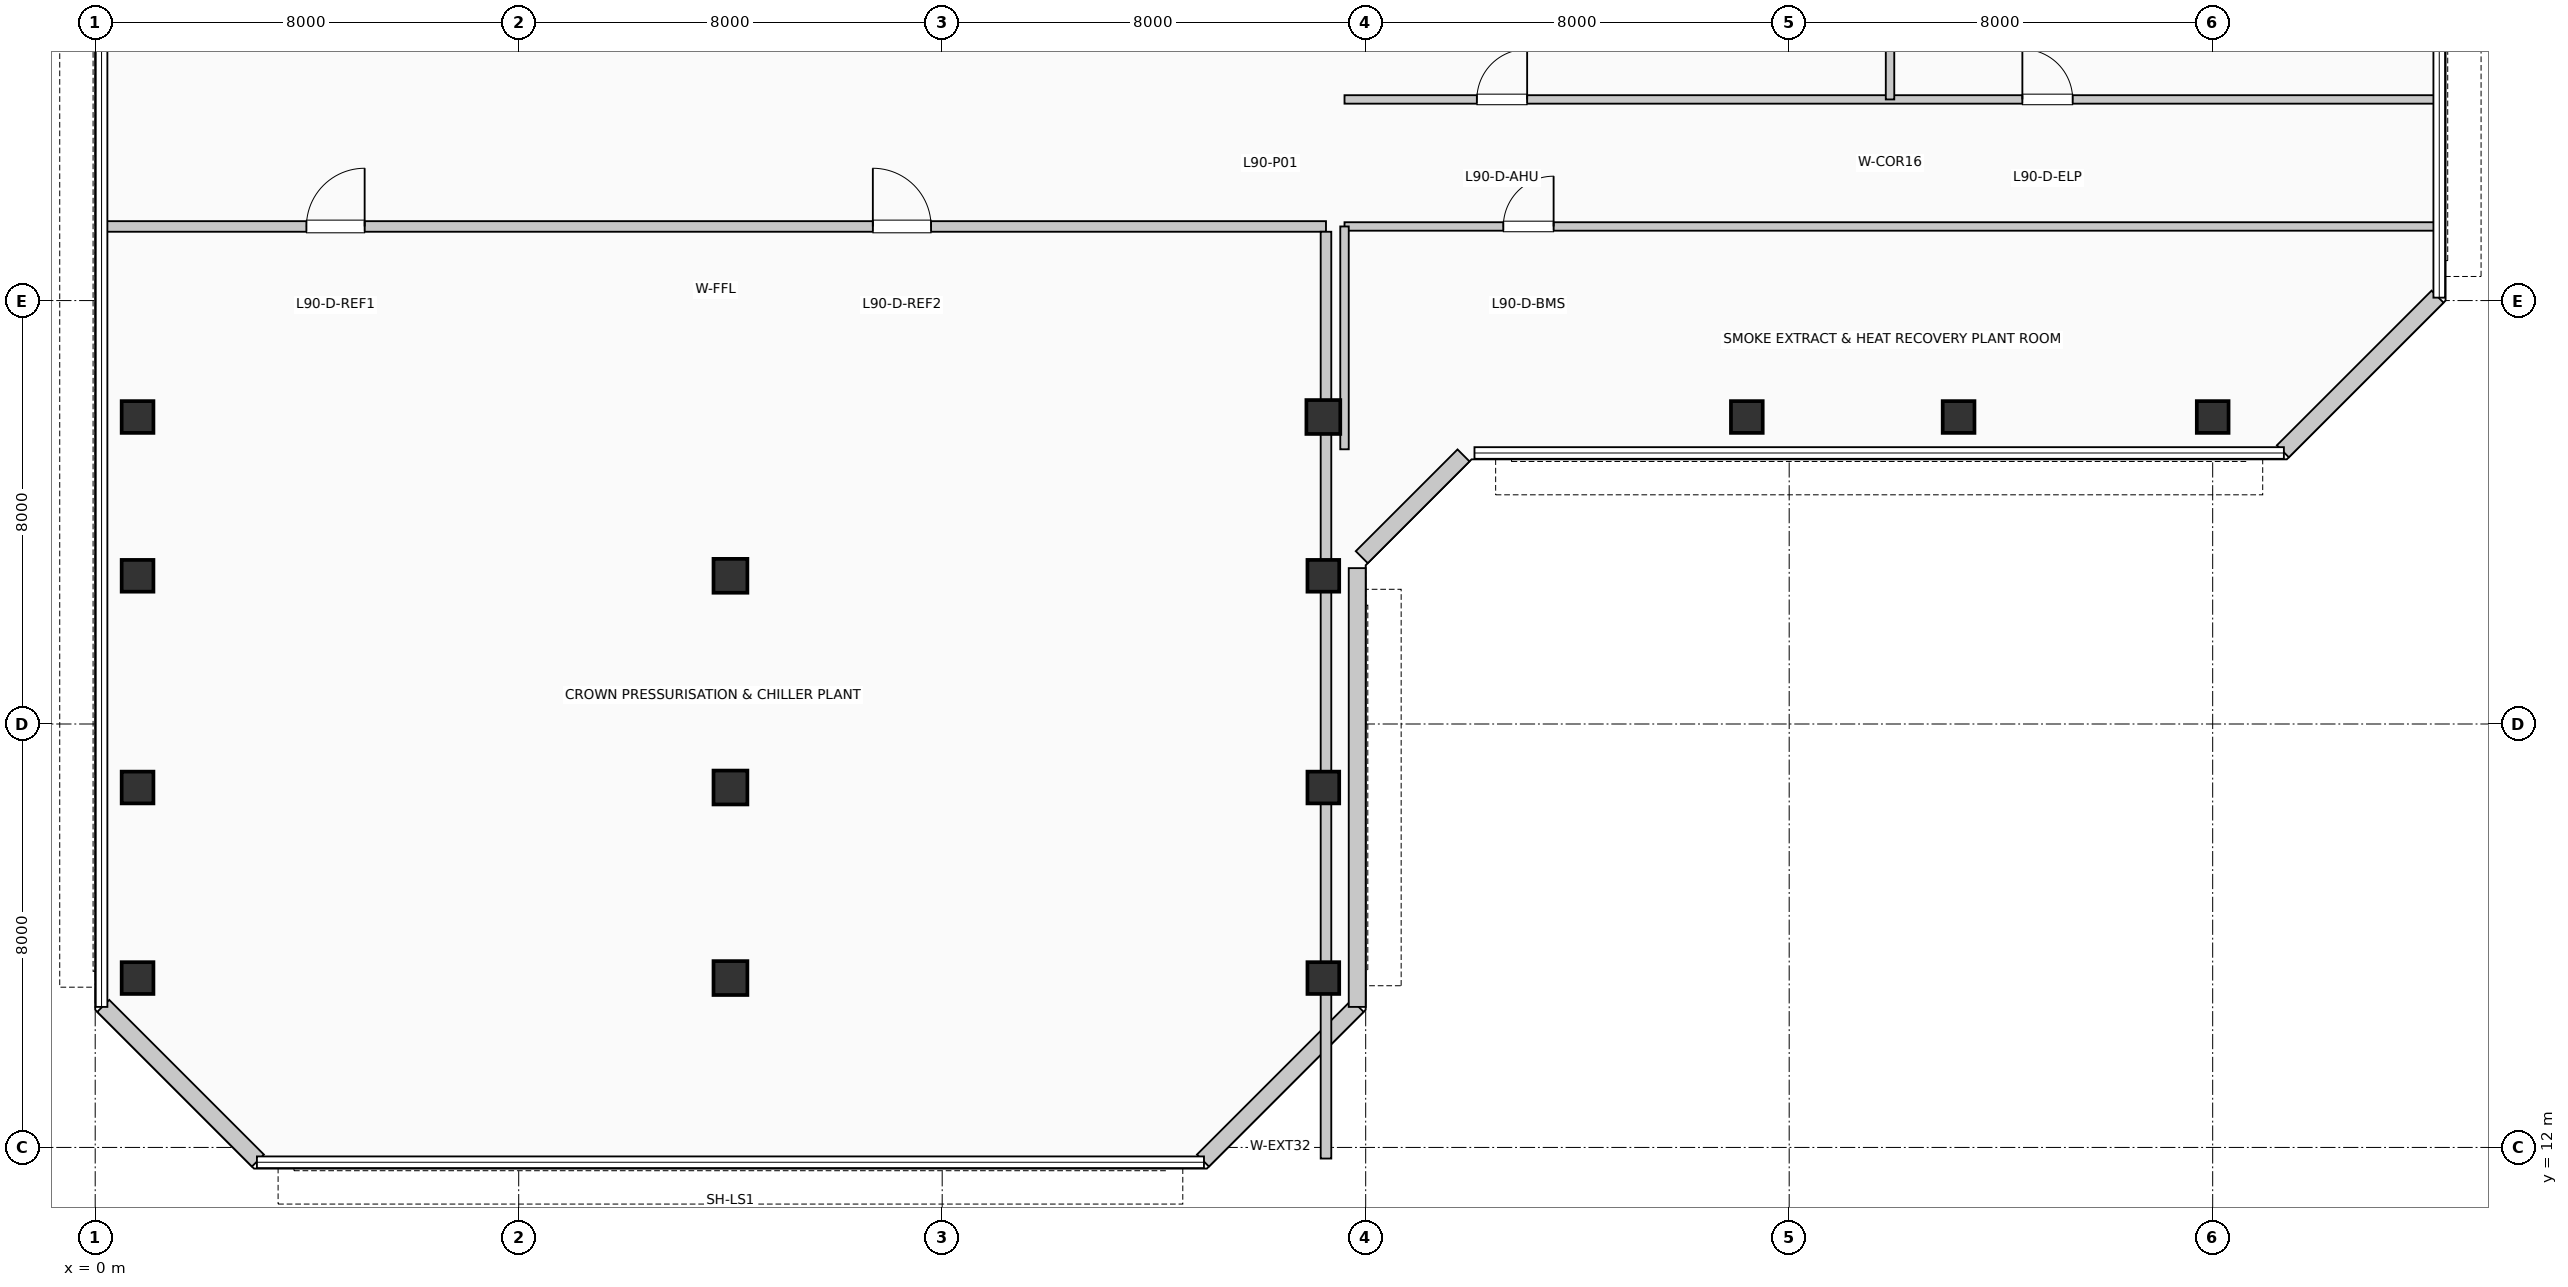
"""IFC4 building model, lengths in metres.
Left out: names, types, materials, properties, quantities, classifications, styles, units other than length and angle.
Written with IfcOpenShell. Run it as: python <this file> out.ifc"""

import sys

from ifc_helpers import new_model, si_unit, direction, frame, frame_2d, origin, origin_2d, place, context, subcontext, project, spatial, rectangle, extrude, element, fill, save


model = new_model("IFC4")
c1 = context("Model", 3, precision=1e-05, world=origin(), true_north=direction((0.0, 1.0)))
c2 = subcontext(c1, "Body", "Model", "MODEL_VIEW")
j1 = project(units=[si_unit("LENGTHUNIT", "METRE"), si_unit("PLANEANGLEUNIT", "RADIAN")], contexts=[c1])
p1 = place(None, origin())
s1 = spatial("IfcSite", under=j1, at=p1, CompositionType="ELEMENT")
p2 = place(p1, origin())
s2 = spatial("IfcBuilding", under=s1, at=p2, CompositionType="ELEMENT")
p3 = place(p2, frame((0.0, 0.0, 369.93)))
s3 = spatial("IfcBuildingStorey", under=s2, at=p3, CompositionType="ELEMENT", Elevation=369.93)
for number, where, z_axis, x_axis in (
    (1, (0.8, 15.2, 0.0), (0.0, 0.0, 1.0), (1.0, 0.0, 0.0)),
    (2, (0.8, 18.8, 0.0), (0.0, 0.0, 1.0), (1.0, 0.0, 0.0)),
    (3, (0.8, 22.8, 0.0), (0.0, 0.0, 1.0), (1.0, 0.0, 0.0)),
    (4, (0.8, 25.8, 0.0), (0.0, 0.0, 1.0), (1.0, 0.0, 0.0)),
):
    element("IfcColumn", number, at=place(p3, frame(where, z_axis=z_axis, x_axis=x_axis)), inside=s3, PredefinedType="COLUMN", context=c2, shape_type="SweptSolid", body=[
        extrude(rectangle(XDim=0.6, YDim=0.6, at=origin_2d()), origin(), (0.0, 0.0, 1.0), 3.96),
    ])
for number, where, z_axis, x_axis in (
    (5, (12.0, 15.2, 0.0), (0.0, 0.0, 1.0), (1.0, 0.0, 0.0)),
    (6, (12.0, 18.8, 0.0), (0.0, 0.0, 1.0), (1.0, 0.0, 0.0)),
    (7, (12.0, 22.8, 0.0), (0.0, 0.0, 1.0), (1.0, 0.0, 0.0)),
):
    element("IfcColumn", number, at=place(p3, frame(where, z_axis=z_axis, x_axis=x_axis)), inside=s3, PredefinedType="COLUMN", context=c2, shape_type="SweptSolid", body=[
        extrude(rectangle(XDim=0.64, YDim=0.64, at=origin_2d()), origin(), (0.0, 0.0, 1.0), 3.96),
    ])
for number, where, z_axis, x_axis in (
    (8, (23.2, 15.2, 0.0), (0.0, 0.0, 1.0), (1.0, 0.0, 0.0)),
    (9, (23.2, 18.8, 0.0), (0.0, 0.0, 1.0), (1.0, 0.0, 0.0)),
    (10, (23.2, 22.8, 0.0), (0.0, 0.0, 1.0), (1.0, 0.0, 0.0)),
):
    element("IfcColumn", number, at=place(p3, frame(where, z_axis=z_axis, x_axis=x_axis)), inside=s3, PredefinedType="COLUMN", context=c2, shape_type="SweptSolid", body=[
        extrude(rectangle(XDim=0.6, YDim=0.6, at=origin_2d()), origin(), (0.0, 0.0, 1.0), 3.96),
    ])
p4 = place(p3, frame((23.2, 25.8, 0.0), z_axis=(0.0, 0.0, 1.0), x_axis=(1.0, 0.0, 0.0)))
e11 = element("IfcColumn", 11, at=p4, inside=s3, PredefinedType="COLUMN", context=c2, shape_type="SweptSolid", body=[
    extrude(rectangle(XDim=0.64, YDim=0.64, at=origin_2d()), origin(), (0.0, 0.0, 1.0), 3.96),
])
for number, where, z_axis, x_axis in (
    (12, (31.2, 25.8, 0.0), (0.0, 0.0, 1.0), (1.0, 0.0, 0.0)),
    (13, (35.2, 25.8, 0.0), (0.0, 0.0, 1.0), (1.0, 0.0, 0.0)),
    (14, (40.0, 25.8, 0.0), (0.0, 0.0, 1.0), (1.0, 0.0, 0.0)),
):
    element("IfcColumn", number, at=place(p3, frame(where, z_axis=z_axis, x_axis=x_axis)), inside=s3, PredefinedType="COLUMN", context=c2, shape_type="SweptSolid", body=[
        extrude(rectangle(XDim=0.6, YDim=0.6, at=origin_2d()), origin(), (0.0, 0.0, 1.0), 3.96),
    ])
p5 = place(p3, frame((20.926, 11.752, 0.0), z_axis=(0.0, 0.0, 1.0), x_axis=(0.707077242712, 0.707136318428, 0.0)))
e15 = element("IfcWall", 15, at=p5, inside=s3, PredefinedType="SOLIDWALL", context=c2, shape_type="SweptSolid", body=[
    extrude(rectangle(XDim=4.133, YDim=0.32, at=frame_2d((2.066, 0.0))), origin(), (0.0, 0.0, 1.0), 3.96),
])
p6 = place(p3, frame((23.84, 14.655, 0.0), z_axis=(0.0, 0.0, 1.0), x_axis=(0.0, 1.0, 0.0)))
e16 = element("IfcWall", 16, at=p6, inside=s3, PredefinedType="SOLIDWALL", context=c2, shape_type="SweptSolid", body=[
    extrude(rectangle(XDim=8.29, YDim=0.32, at=frame_2d((4.145, 0.0))), origin(), (0.0, 0.0, 1.0), 3.96),
])
p7 = place(p3, frame((23.926, 23.152, 0.0), z_axis=(0.0, 0.0, 1.0), x_axis=(0.707106781187, 0.707106781187, 0.0)))
e17 = element("IfcWall", 17, at=p7, inside=s3, PredefinedType="SOLIDWALL", context=c2, shape_type="SweptSolid", body=[
    extrude(rectangle(XDim=2.718, YDim=0.32, at=frame_2d((1.359, 0.0))), origin(), (0.0, 0.0, 1.0), 3.96),
])
for number, where, z_axis, x_axis in (
    (18, (41.326, 25.152, 0.0), (0.0, 0.0, 1.0), (0.707, 0.707, 0.0)),
    (19, (0.152, 14.674, 0.0), (0.0, 0.0, 1.0), (0.707, -0.707, 0.0)),
):
    element("IfcWall", number, at=place(p3, frame(where, z_axis=z_axis, x_axis=x_axis)), inside=s3, PredefinedType="SOLIDWALL", context=c2, shape_type="SweptSolid", body=[
        extrude(rectangle(XDim=4.133, YDim=0.32, at=frame_2d((2.066, 0.0))), origin(), (0.0, 0.0, 1.0), 3.96),
    ])
p8 = place(p3, frame((0.19, 29.4, 0.0), z_axis=(0.0, 0.0, 1.0), x_axis=(1.0, 0.0, 0.0)))
e20 = element("IfcWall", 20, at=p8, inside=s3, PredefinedType="PARTITIONING", context=c2, shape_type="SweptSolid", body=[
    extrude(rectangle(XDim=23.06, YDim=0.2, at=frame_2d((11.53, 0.0))), origin(), (0.0, 0.0, 1.0), 3.385),
])
p9 = place(p8, frame((3.8, 0.0, 0.0)))
e21 = element("IfcOpeningElement", 21, at=p9, cuts=e20, PredefinedType="OPENING", context=c2, shape_type="SweptSolid", body=[
    extrude(rectangle(XDim=1.1, YDim=2.15, at=frame_2d((0.55, 1.075))), frame((0.0, 0.11, 0.0), z_axis=(0.0, -1.0, 0.0), x_axis=(1.0, 0.0, 0.0)), (0.0, 0.0, 1.0), 0.22),
])
p10 = place(p8, frame((14.5, 0.0, 0.0)))
e22 = element("IfcOpeningElement", 22, at=p10, cuts=e20, PredefinedType="OPENING", context=c2, shape_type="SweptSolid", body=[
    extrude(rectangle(XDim=1.1, YDim=2.15, at=frame_2d((0.55, 1.075))), frame((0.0, 0.11, 0.0), z_axis=(0.0, -1.0, 0.0), x_axis=(1.0, 0.0, 0.0)), (0.0, 0.0, 1.0), 0.22),
])
p11 = place(p3, frame((23.25, 11.79, 0.0), z_axis=(0.0, 0.0, 1.0), x_axis=(0.0, 1.0, 0.0)))
e23 = element("IfcWall", 23, at=p11, inside=s3, PredefinedType="PARTITIONING", context=c2, shape_type="SweptSolid", body=[
    extrude(rectangle(XDim=17.51, YDim=0.2, at=frame_2d((8.755, 0.0))), origin(), (0.0, 0.0, 1.0), 3.185),
])
p12 = place(p3, frame((23.6, 31.8, 0.0), z_axis=(0.0, 0.0, 1.0), x_axis=(1.0, 0.0, 0.0)))
e24 = element("IfcWall", 24, at=p12, inside=s3, PredefinedType="PARTITIONING", context=c2, shape_type="SweptSolid", body=[
    extrude(rectangle(XDim=20.61, YDim=0.16, at=frame_2d((10.305, 0.0))), origin(), (0.0, 0.0, 1.0), 3.96),
])
p13 = place(p12, frame((2.5, 0.0, 0.0)))
e25 = element("IfcOpeningElement", 25, at=p13, cuts=e24, PredefinedType="OPENING", context=c2, shape_type="SweptSolid", body=[
    extrude(rectangle(XDim=0.95, YDim=2.1, at=frame_2d((0.475, 1.05))), frame((0.0, 0.09, 0.0), z_axis=(0.0, -1.0, 0.0), x_axis=(1.0, 0.0, 0.0)), (0.0, 0.0, 1.0), 0.18),
])
p14 = place(p12, frame((12.805, 0.0, 0.0)))
e26 = element("IfcOpeningElement", 26, at=p14, cuts=e24, PredefinedType="OPENING", context=c2, shape_type="SweptSolid", body=[
    extrude(rectangle(XDim=0.95, YDim=2.1, at=frame_2d((0.475, 1.05))), frame((0.0, 0.09, 0.0), z_axis=(0.0, -1.0, 0.0), x_axis=(1.0, 0.0, 0.0)), (0.0, 0.0, 1.0), 0.18),
])
p15 = place(p3, frame((33.905, 31.8, 0.0), z_axis=(0.0, 0.0, 1.0), x_axis=(0.0, 1.0, 0.0)))
e27 = element("IfcWall", 27, at=p15, inside=s3, PredefinedType="PARTITIONING", context=c2, shape_type="SweptSolid", body=[
    extrude(rectangle(XDim=14.01, YDim=0.16, at=frame_2d((7.005, 0.0))), origin(), (0.0, 0.0, 1.0), 3.96),
])
p16 = place(p3, frame((23.6, 29.4, 0.0), z_axis=(0.0, 0.0, 1.0), x_axis=(1.0, 0.0, 0.0)))
e28 = element("IfcWall", 28, at=p16, inside=s3, PredefinedType="PARTITIONING", context=c2, shape_type="SweptSolid", body=[
    extrude(rectangle(XDim=20.61, YDim=0.16, at=frame_2d((10.305, 0.0))), origin(), (0.0, 0.0, 1.0), 3.385),
])
p17 = place(p16, frame((3.0, 0.0, 0.0)))
e29 = element("IfcOpeningElement", 29, at=p17, cuts=e28, PredefinedType="OPENING", context=c2, shape_type="SweptSolid", body=[
    extrude(rectangle(XDim=0.95, YDim=2.1, at=frame_2d((0.475, 1.05))), frame((0.0, 0.09, 0.0), z_axis=(0.0, -1.0, 0.0), x_axis=(1.0, 0.0, 0.0)), (0.0, 0.0, 1.0), 0.18),
])
p18 = place(p3, frame((23.6, 25.19, 0.0), z_axis=(0.0, 0.0, 1.0), x_axis=(0.0, 1.0, 0.0)))
e30 = element("IfcWall", 30, at=p18, inside=s3, PredefinedType="PARTITIONING", context=c2, shape_type="SweptSolid", body=[
    extrude(rectangle(XDim=4.21, YDim=0.16, at=frame_2d((2.105, 0.0))), origin(), (0.0, 0.0, 1.0), 3.185),
])
p19 = place(p9, origin())
e31 = element("IfcDoor", 31, at=p19, inside=s3, OperationType="SINGLE_SWING_RIGHT", PredefinedType="DOOR", context=c2, shape_type="SweptSolid", body=[
    extrude(rectangle(XDim=1.1, YDim=2.15, at=frame_2d((0.55, 1.075))), frame((0.0, 0.025, 0.0), z_axis=(0.0, -1.0, 0.0), x_axis=(1.0, 0.0, 0.0)), (0.0, 0.0, 1.0), 0.05),
])
fill(e21, e31)
p20 = place(p10, origin())
e32 = element("IfcDoor", 32, at=p20, inside=s3, OperationType="SINGLE_SWING_LEFT", PredefinedType="DOOR", context=c2, shape_type="SweptSolid", body=[
    extrude(rectangle(XDim=1.1, YDim=2.15, at=frame_2d((0.55, 1.075))), frame((0.0, 0.025, 0.0), z_axis=(0.0, -1.0, 0.0), x_axis=(1.0, 0.0, 0.0)), (0.0, 0.0, 1.0), 0.05),
])
fill(e22, e32)
p21 = place(p13, origin())
e33 = element("IfcDoor", 33, at=p21, inside=s3, OperationType="SINGLE_SWING_RIGHT", PredefinedType="DOOR", context=c2, shape_type="SweptSolid", body=[
    extrude(rectangle(XDim=0.95, YDim=2.1, at=frame_2d((0.475, 1.05))), frame((0.0, 0.025, 0.0), z_axis=(0.0, -1.0, 0.0), x_axis=(1.0, 0.0, 0.0)), (0.0, 0.0, 1.0), 0.05),
])
fill(e25, e33)
p22 = place(p14, origin())
e34 = element("IfcDoor", 34, at=p22, inside=s3, OperationType="SINGLE_SWING_LEFT", PredefinedType="DOOR", context=c2, shape_type="SweptSolid", body=[
    extrude(rectangle(XDim=0.95, YDim=2.1, at=frame_2d((0.475, 1.05))), frame((0.0, 0.025, 0.0), z_axis=(0.0, -1.0, 0.0), x_axis=(1.0, 0.0, 0.0)), (0.0, 0.0, 1.0), 0.05),
])
fill(e26, e34)
p23 = place(p17, origin())
e35 = element("IfcDoor", 35, at=p23, inside=s3, OperationType="SINGLE_SWING_RIGHT", PredefinedType="DOOR", context=c2, shape_type="SweptSolid", body=[
    extrude(rectangle(XDim=0.95, YDim=2.1, at=frame_2d((0.475, 1.05))), frame((0.0, 0.025, 0.0), z_axis=(0.0, -1.0, 0.0), x_axis=(1.0, 0.0, 0.0)), (0.0, 0.0, 1.0), 0.05),
])
fill(e29, e35)
save(model, sys.argv[1])
